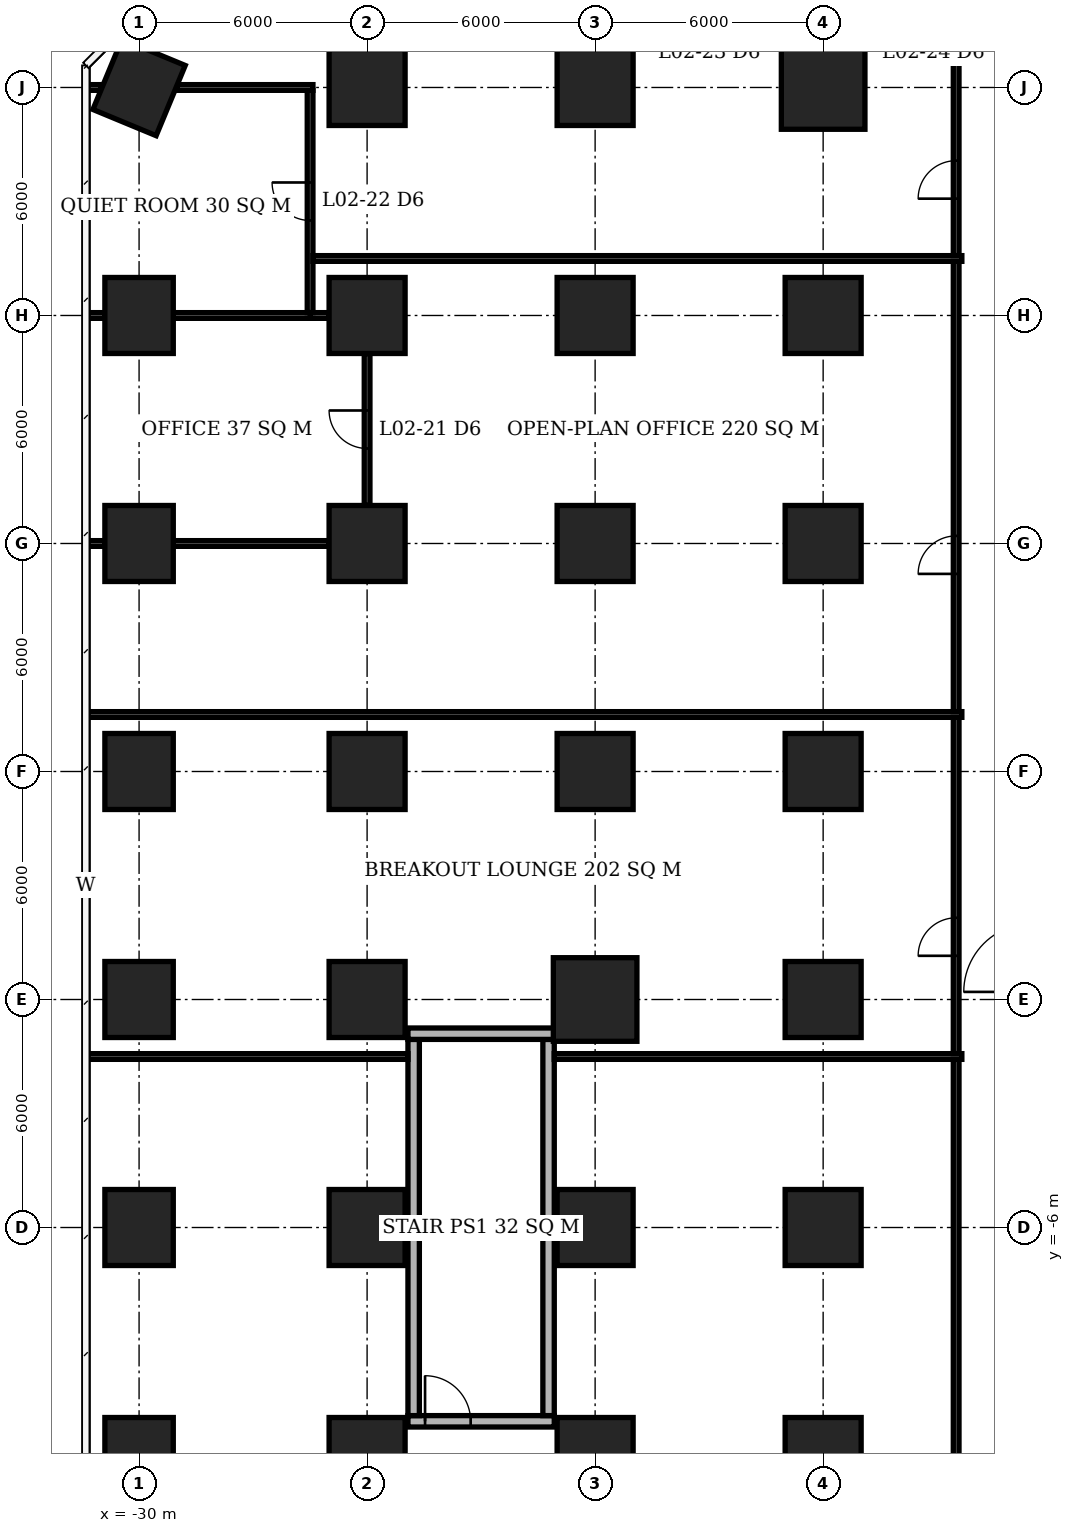
"""IFC4 building model, lengths in metres.
Left out: names, types, materials, properties, quantities, classifications, styles, units other than length and angle.
Written with IfcOpenShell. Run it as: python <this file> out.ifc"""

import sys

from ifc_helpers import new_model, si_unit, direction, frame, frame_2d, origin, origin_2d, place, context, subcontext, project, spatial, rectangle, extrude, element, fill, save


model = new_model("IFC4")
c1 = context("Model", 3, precision=1e-05, world=origin(), true_north=direction((0.0, 1.0)))
c2 = subcontext(c1, "Body", "Model", "MODEL_VIEW")
j1 = project(units=[si_unit("LENGTHUNIT", "METRE"), si_unit("PLANEANGLEUNIT", "RADIAN")], contexts=[c1])
p1 = place(None, origin())
s1 = spatial("IfcSite", under=j1, at=p1, CompositionType="ELEMENT")
p2 = place(p1, origin())
s2 = spatial("IfcBuilding", under=s1, at=p2, CompositionType="ELEMENT")
p3 = place(p2, frame((0.0, 0.0, 11.0)))
s3 = spatial("IfcBuildingStorey", under=s2, at=p3, CompositionType="ELEMENT", Elevation=11.0)
for number, where, z_axis, x_axis in (
    (1, (-30.0, -12.0, 0.0), (0.0, 0.0, 1.0), (0.0, 1.0, 0.0)),
    (2, (-30.0, -6.0, 0.0), (0.0, 0.0, 1.0), (0.0, 1.0, 0.0)),
    (3, (-30.0, 0.0, 0.0), (0.0, 0.0, 1.0), (0.0, 1.0, 0.0)),
    (4, (-30.0, 6.0, 0.0), (0.0, 0.0, 1.0), (0.0, 1.0, 0.0)),
    (5, (-30.0, 12.0, 0.0), (0.0, 0.0, 1.0), (0.0, 1.0, 0.0)),
    (6, (-30.0, 18.0, 0.0), (0.0, 0.0, 1.0), (0.0, 1.0, 0.0)),
    (7, (-30.0, 24.0, 0.0), (0.0, 0.0, 1.0), (0.383, 0.924, 0.0)),
):
    element("IfcColumn", number, at=place(p3, frame(where, z_axis=z_axis, x_axis=x_axis)), inside=s3, PredefinedType="COLUMN", context=c2, shape_type="SweptSolid", body=[
        extrude(rectangle(XDim=2.0, YDim=1.8, at=origin_2d()), origin(), (0.0, 0.0, 1.0), 7.2),
    ])
for number, where, z_axis, x_axis in (
    (8, (-24.0, -12.0, 0.0), (0.0, 0.0, 1.0), (1.0, 0.0, 0.0)),
    (9, (-24.0, -6.0, 0.0), (0.0, 0.0, 1.0), (1.0, 0.0, 0.0)),
    (10, (-24.0, 0.0, 0.0), (0.0, 0.0, 1.0), (1.0, 0.0, 0.0)),
    (11, (-24.0, 6.0, 0.0), (0.0, 0.0, 1.0), (1.0, 0.0, 0.0)),
    (12, (-24.0, 12.0, 0.0), (0.0, 0.0, 1.0), (1.0, 0.0, 0.0)),
    (13, (-24.0, 18.0, 0.0), (0.0, 0.0, 1.0), (1.0, 0.0, 0.0)),
    (14, (-24.0, 24.0, 0.0), (0.0, 0.0, 1.0), (1.0, 0.0, 0.0)),
    (15, (-18.0, -12.0, 0.0), (0.0, 0.0, 1.0), (1.0, 0.0, 0.0)),
    (16, (-18.0, -6.0, 0.0), (0.0, 0.0, 1.0), (1.0, 0.0, 0.0)),
):
    element("IfcColumn", number, at=place(p3, frame(where, z_axis=z_axis, x_axis=x_axis)), inside=s3, PredefinedType="COLUMN", context=c2, shape_type="SweptSolid", body=[
        extrude(rectangle(XDim=2.0, YDim=2.0, at=origin_2d()), origin(), (0.0, 0.0, 1.0), 7.2),
    ])
p4 = place(p3, frame((-18.0, 0.0, 0.0), z_axis=(0.0, 0.0, 1.0), x_axis=(1.0, 0.0, 0.0)))
e17 = element("IfcColumn", 17, at=p4, inside=s3, PredefinedType="COLUMN", context=c2, shape_type="SweptSolid", body=[
    extrude(rectangle(XDim=2.2, YDim=2.2, at=origin_2d()), origin(), (0.0, 0.0, 1.0), 7.2),
])
for number, where, z_axis, x_axis in (
    (18, (-18.0, 6.0, 0.0), (0.0, 0.0, 1.0), (1.0, 0.0, 0.0)),
    (19, (-18.0, 12.0, 0.0), (0.0, 0.0, 1.0), (1.0, 0.0, 0.0)),
    (20, (-18.0, 18.0, 0.0), (0.0, 0.0, 1.0), (1.0, 0.0, 0.0)),
    (21, (-18.0, 24.0, 0.0), (0.0, 0.0, 1.0), (1.0, 0.0, 0.0)),
    (22, (-12.0, -12.0, 0.0), (0.0, 0.0, 1.0), (1.0, 0.0, 0.0)),
    (23, (-12.0, -6.0, 0.0), (0.0, 0.0, 1.0), (1.0, 0.0, 0.0)),
    (24, (-12.0, 0.0, 0.0), (0.0, 0.0, 1.0), (1.0, 0.0, 0.0)),
    (25, (-12.0, 6.0, 0.0), (0.0, 0.0, 1.0), (1.0, 0.0, 0.0)),
    (26, (-12.0, 12.0, 0.0), (0.0, 0.0, 1.0), (1.0, 0.0, 0.0)),
    (27, (-12.0, 18.0, 0.0), (0.0, 0.0, 1.0), (1.0, 0.0, 0.0)),
):
    element("IfcColumn", number, at=place(p3, frame(where, z_axis=z_axis, x_axis=x_axis)), inside=s3, PredefinedType="COLUMN", context=c2, shape_type="SweptSolid", body=[
        extrude(rectangle(XDim=2.0, YDim=2.0, at=origin_2d()), origin(), (0.0, 0.0, 1.0), 7.2),
    ])
p5 = place(p3, frame((-12.0, 24.0, 0.0), z_axis=(0.0, 0.0, 1.0), x_axis=(1.0, 0.0, 0.0)))
e28 = element("IfcColumn", 28, at=p5, inside=s3, PredefinedType="COLUMN", context=c2, shape_type="SweptSolid", body=[
    extrude(rectangle(XDim=2.2, YDim=2.2, at=origin_2d()), origin(), (0.0, 0.0, 1.0), 7.2),
])
p6 = place(p3, frame((-22.925, -11.1, 0.0), z_axis=(0.0, 0.0, 1.0), x_axis=(1.0, 0.0, 0.0)))
e29 = element("IfcWall", 29, at=p6, inside=s3, PredefinedType="PARTITIONING", context=c2, shape_type="SweptSolid", body=[
    extrude(rectangle(XDim=3.85, YDim=0.3, at=frame_2d((1.925, 0.0))), origin(), (0.0, 0.0, 1.0), 6.95),
])
p7 = place(p6, frame((0.45, 0.0, 0.0)))
e30 = element("IfcOpeningElement", 30, at=p7, cuts=e29, PredefinedType="OPENING", context=c2, shape_type="SweptSolid", body=[
    extrude(rectangle(XDim=1.2, YDim=2.1, at=frame_2d((0.6, 1.05))), frame((0.0, 0.16, 0.0), z_axis=(0.0, -1.0, 0.0), x_axis=(1.0, 0.0, 0.0)), (0.0, 0.0, 1.0), 0.32),
])
p8 = place(p3, frame((-22.925, -0.9, 0.0), z_axis=(0.0, 0.0, 1.0), x_axis=(1.0, 0.0, 0.0)))
e31 = element("IfcWall", 31, at=p8, inside=s3, PredefinedType="PARTITIONING", context=c2, shape_type="SweptSolid", body=[
    extrude(rectangle(XDim=3.85, YDim=0.3, at=frame_2d((1.925, 0.0))), origin(), (0.0, 0.0, 1.0), 6.95),
])
for number, where, z_axis, x_axis in (
    (32, (-22.775, -10.95, 0.0), (0.0, 0.0, 1.0), (0.0, 1.0, 0.0)),
    (33, (-19.225, -10.95, 0.0), (0.0, 0.0, 1.0), (0.0, 1.0, 0.0)),
):
    element("IfcWall", number, at=place(p3, frame(where, z_axis=z_axis, x_axis=x_axis)), inside=s3, PredefinedType="PARTITIONING", context=c2, shape_type="SweptSolid", body=[
        extrude(rectangle(XDim=9.9, YDim=0.3, at=frame_2d((4.95, 0.0))), origin(), (0.0, 0.0, 1.0), 6.95),
    ])
p9 = place(p3, frame((-31.375, 12.0, 0.0), z_axis=(0.0, 0.0, 1.0), x_axis=(1.0, 0.0, 0.0)))
e34 = element("IfcWall", 34, at=p9, inside=s3, PredefinedType="PARTITIONING", context=c2, shape_type="SweptSolid", body=[
    extrude(rectangle(XDim=0.475, YDim=0.15, at=frame_2d((0.238, 0.0))), origin(), (0.0, 0.0, 1.0), 6.8),
])
p10 = place(p3, frame((-29.1, 12.0, 0.0), z_axis=(0.0, 0.0, 1.0), x_axis=(1.0, 0.0, 0.0)))
e35 = element("IfcWall", 35, at=p10, inside=s3, PredefinedType="PARTITIONING", context=c2, shape_type="SweptSolid", body=[
    extrude(rectangle(XDim=4.1, YDim=0.15, at=frame_2d((2.05, 0.0))), origin(), (0.0, 0.0, 1.0), 6.8),
])
p11 = place(p3, frame((-31.375, 18.0, 0.0), z_axis=(0.0, 0.0, 1.0), x_axis=(1.0, 0.0, 0.0)))
e36 = element("IfcWall", 36, at=p11, inside=s3, PredefinedType="PARTITIONING", context=c2, shape_type="SweptSolid", body=[
    extrude(rectangle(XDim=0.475, YDim=0.15, at=frame_2d((0.238, 0.0))), origin(), (0.0, 0.0, 1.0), 6.8),
])
p12 = place(p3, frame((-29.1, 18.0, 0.0), z_axis=(0.0, 0.0, 1.0), x_axis=(1.0, 0.0, 0.0)))
e37 = element("IfcWall", 37, at=p12, inside=s3, PredefinedType="PARTITIONING", context=c2, shape_type="SweptSolid", body=[
    extrude(rectangle(XDim=3.675, YDim=0.15, at=frame_2d((1.837, 0.0))), origin(), (0.0, 0.0, 1.0), 6.8),
])
p13 = place(p3, frame((-25.5, 18.0, 0.0), z_axis=(0.0, 0.0, 1.0), x_axis=(1.0, 0.0, 0.0)))
e38 = element("IfcWall", 38, at=p13, inside=s3, PredefinedType="PARTITIONING", context=c2, shape_type="SweptSolid", body=[
    extrude(rectangle(XDim=0.5, YDim=0.15, at=frame_2d((0.25, 0.0))), origin(), (0.0, 0.0, 1.0), 6.8),
])
p14 = place(p3, frame((-31.375, 24.0, 0.0), z_axis=(0.0, 0.0, 1.0), x_axis=(1.0, 0.0, 0.0)))
e39 = element("IfcWall", 39, at=p14, inside=s3, PredefinedType="PARTITIONING", context=c2, shape_type="SweptSolid", body=[
    extrude(rectangle(XDim=0.37, YDim=0.15, at=frame_2d((0.185, 0.0))), origin(), (0.0, 0.0, 1.0), 6.8),
])
p15 = place(p3, frame((-28.995, 24.0, 0.0), z_axis=(0.0, 0.0, 1.0), x_axis=(1.0, 0.0, 0.0)))
e40 = element("IfcWall", 40, at=p15, inside=s3, PredefinedType="PARTITIONING", context=c2, shape_type="SweptSolid", body=[
    extrude(rectangle(XDim=3.57, YDim=0.15, at=frame_2d((1.785, 0.0))), origin(), (0.0, 0.0, 1.0), 6.8),
])
p16 = place(p3, frame((-25.5, 18.075, 0.0), z_axis=(0.0, 0.0, 1.0), x_axis=(0.0, 1.0, 0.0)))
e41 = element("IfcWall", 41, at=p16, inside=s3, PredefinedType="PARTITIONING", context=c2, shape_type="SweptSolid", body=[
    extrude(rectangle(XDim=5.85, YDim=0.15, at=frame_2d((2.925, 0.0))), origin(), (0.0, 0.0, 1.0), 6.8),
])
p17 = place(p16, frame((2.425, 0.0, 0.0)))
e42 = element("IfcOpeningElement", 42, at=p17, cuts=e41, PredefinedType="OPENING", context=c2, shape_type="SweptSolid", body=[
    extrude(rectangle(XDim=1.0, YDim=2.1, at=frame_2d((0.5, 1.05))), frame((0.0, 0.085, 0.0), z_axis=(0.0, -1.0, 0.0), x_axis=(1.0, 0.0, 0.0)), (0.0, 0.0, 1.0), 0.17),
])
p18 = place(p3, frame((-24.0, 13.0, 0.0), z_axis=(0.0, 0.0, 1.0), x_axis=(0.0, 1.0, 0.0)))
e43 = element("IfcWall", 43, at=p18, inside=s3, PredefinedType="PARTITIONING", context=c2, shape_type="SweptSolid", body=[
    extrude(rectangle(XDim=4.0, YDim=0.15, at=frame_2d((2.0, 0.0))), origin(), (0.0, 0.0, 1.0), 6.8),
])
p19 = place(p18, frame((1.5, 0.0, 0.0)))
e44 = element("IfcOpeningElement", 44, at=p19, cuts=e43, PredefinedType="OPENING", context=c2, shape_type="SweptSolid", body=[
    extrude(rectangle(XDim=1.0, YDim=2.1, at=frame_2d((0.5, 1.05))), frame((0.0, 0.085, 0.0), z_axis=(0.0, -1.0, 0.0), x_axis=(1.0, 0.0, 0.0)), (0.0, 0.0, 1.0), 0.17),
])
p20 = place(p3, frame((-31.375, -1.5, 0.0), z_axis=(0.0, 0.0, 1.0), x_axis=(1.0, 0.0, 0.0)))
e45 = element("IfcWall", 45, at=p20, inside=s3, PredefinedType="PARTITIONING", context=c2, shape_type="SweptSolid", body=[
    extrude(rectangle(XDim=8.45, YDim=0.15, at=frame_2d((4.225, 0.0))), origin(), (0.0, 0.0, 1.0), 6.95),
])
p21 = place(p3, frame((-31.375, 7.5, 0.0), z_axis=(0.0, 0.0, 1.0), x_axis=(1.0, 0.0, 0.0)))
e46 = element("IfcWall", 46, at=p21, inside=s3, PredefinedType="PARTITIONING", context=c2, shape_type="SweptSolid", body=[
    extrude(rectangle(XDim=23.025, YDim=0.15, at=frame_2d((11.512, 0.0))), origin(), (0.0, 0.0, 1.0), 6.95),
])
p22 = place(p3, frame((-25.425, 19.5, 0.0), z_axis=(0.0, 0.0, 1.0), x_axis=(1.0, 0.0, 0.0)))
e47 = element("IfcWall", 47, at=p22, inside=s3, PredefinedType="PARTITIONING", context=c2, shape_type="SweptSolid", body=[
    extrude(rectangle(XDim=17.075, YDim=0.15, at=frame_2d((8.538, 0.0))), origin(), (0.0, 0.0, 1.0), 6.95),
])
p23 = place(p3, frame((-19.075, -1.5, 0.0), z_axis=(0.0, 0.0, 1.0), x_axis=(1.0, 0.0, 0.0)))
e48 = element("IfcWall", 48, at=p23, inside=s3, PredefinedType="PARTITIONING", context=c2, shape_type="SweptSolid", body=[
    extrude(rectangle(XDim=10.725, YDim=0.15, at=frame_2d((5.362, 0.0))), origin(), (0.0, 0.0, 1.0), 6.95),
])
p24 = place(p3, frame((-8.5, -19.425, 0.0), z_axis=(0.0, 0.0, 1.0), x_axis=(0.0, 1.0, 0.0)))
e49 = element("IfcWall", 49, at=p24, inside=s3, PredefinedType="PARTITIONING", context=c2, shape_type="SweptSolid", body=[
    extrude(rectangle(XDim=17.85, YDim=0.15, at=frame_2d((8.925, 0.0))), origin(), (0.0, 0.0, 1.0), 6.95),
])
p25 = place(p24, frame((5.774, 0.0, 0.0)))
e50 = element("IfcOpeningElement", 50, at=p25, cuts=e49, PredefinedType="OPENING", context=c2, shape_type="SweptSolid", body=[
    extrude(rectangle(XDim=1.0, YDim=2.1, at=frame_2d((0.5, 1.05))), frame((0.0, 0.085, 0.0), z_axis=(0.0, -1.0, 0.0), x_axis=(1.0, 0.0, 0.0)), (0.0, 0.0, 1.0), 0.17),
])
p26 = place(p3, frame((-8.5, -1.425, 0.0), z_axis=(0.0, 0.0, 1.0), x_axis=(0.0, 1.0, 0.0)))
e51 = element("IfcWall", 51, at=p26, inside=s3, PredefinedType="PARTITIONING", context=c2, shape_type="SweptSolid", body=[
    extrude(rectangle(XDim=8.85, YDim=0.15, at=frame_2d((4.425, 0.0))), origin(), (0.0, 0.0, 1.0), 6.95),
])
p27 = place(p26, frame((2.575, 0.0, 0.0)))
e52 = element("IfcOpeningElement", 52, at=p27, cuts=e51, PredefinedType="OPENING", context=c2, shape_type="SweptSolid", body=[
    extrude(rectangle(XDim=1.0, YDim=2.1, at=frame_2d((0.5, 1.05))), frame((0.0, 0.085, 0.0), z_axis=(0.0, -1.0, 0.0), x_axis=(1.0, 0.0, 0.0)), (0.0, 0.0, 1.0), 0.17),
])
p28 = place(p3, frame((-8.5, 7.575, 0.0), z_axis=(0.0, 0.0, 1.0), x_axis=(0.0, 1.0, 0.0)))
e53 = element("IfcWall", 53, at=p28, inside=s3, PredefinedType="PARTITIONING", context=c2, shape_type="SweptSolid", body=[
    extrude(rectangle(XDim=11.85, YDim=0.15, at=frame_2d((5.925, 0.0))), origin(), (0.0, 0.0, 1.0), 6.95),
])
p29 = place(p28, frame((3.625, 0.0, 0.0)))
e54 = element("IfcOpeningElement", 54, at=p29, cuts=e53, PredefinedType="OPENING", context=c2, shape_type="SweptSolid", body=[
    extrude(rectangle(XDim=1.0, YDim=2.1, at=frame_2d((0.5, 1.05))), frame((0.0, 0.085, 0.0), z_axis=(0.0, -1.0, 0.0), x_axis=(1.0, 0.0, 0.0)), (0.0, 0.0, 1.0), 0.17),
])
p30 = place(p3, frame((-8.5, 19.575, 0.0), z_axis=(0.0, 0.0, 1.0), x_axis=(0.0, 1.0, 0.0)))
e55 = element("IfcWall", 55, at=p30, inside=s3, PredefinedType="PARTITIONING", context=c2, shape_type="SweptSolid", body=[
    extrude(rectangle(XDim=5.85, YDim=0.15, at=frame_2d((2.925, 0.0))), origin(), (0.0, 0.0, 1.0), 6.95),
])
p31 = place(p30, frame((1.499, 0.0, 0.0)))
e56 = element("IfcOpeningElement", 56, at=p31, cuts=e55, PredefinedType="OPENING", context=c2, shape_type="SweptSolid", body=[
    extrude(rectangle(XDim=1.0, YDim=2.1, at=frame_2d((0.5, 1.05))), frame((0.0, 0.085, 0.0), z_axis=(0.0, -1.0, 0.0), x_axis=(1.0, 0.0, 0.0)), (0.0, 0.0, 1.0), 0.17),
])
p32 = place(p7, origin())
e57 = element("IfcDoor", 57, at=p32, inside=s3, OperationType="SINGLE_SWING_LEFT", PredefinedType="DOOR", context=c2, shape_type="SweptSolid", body=[
    extrude(rectangle(XDim=1.2, YDim=2.1, at=frame_2d((0.6, 1.05))), frame((0.0, 0.025, 0.0), z_axis=(0.0, -1.0, 0.0), x_axis=(1.0, 0.0, 0.0)), (0.0, 0.0, 1.0), 0.05),
])
fill(e30, e57)
p33 = place(p19, origin())
e58 = element("IfcDoor", 58, at=p33, inside=s3, OperationType="SINGLE_SWING_RIGHT", PredefinedType="DOOR", context=c2, shape_type="SweptSolid", body=[
    extrude(rectangle(XDim=1.0, YDim=2.1, at=frame_2d((0.5, 1.05))), frame((0.0, 0.025, 0.0), z_axis=(0.0, -1.0, 0.0), x_axis=(1.0, 0.0, 0.0)), (0.0, 0.0, 1.0), 0.05),
])
fill(e44, e58)
p34 = place(p17, origin())
e59 = element("IfcDoor", 59, at=p34, inside=s3, OperationType="SINGLE_SWING_RIGHT", PredefinedType="DOOR", context=c2, shape_type="SweptSolid", body=[
    extrude(rectangle(XDim=1.0, YDim=2.1, at=frame_2d((0.5, 1.05))), frame((0.0, 0.025, 0.0), z_axis=(0.0, -1.0, 0.0), x_axis=(1.0, 0.0, 0.0)), (0.0, 0.0, 1.0), 0.05),
])
fill(e42, e59)
p35 = place(p27, origin())
e60 = element("IfcDoor", 60, at=p35, inside=s3, OperationType="SINGLE_SWING_LEFT", PredefinedType="DOOR", context=c2, shape_type="SweptSolid", body=[
    extrude(rectangle(XDim=1.0, YDim=2.1, at=frame_2d((0.5, 1.05))), frame((0.0, 0.025, 0.0), z_axis=(0.0, -1.0, 0.0), x_axis=(1.0, 0.0, 0.0)), (0.0, 0.0, 1.0), 0.05),
])
fill(e52, e60)
p36 = place(p29, origin())
e61 = element("IfcDoor", 61, at=p36, inside=s3, OperationType="SINGLE_SWING_LEFT", PredefinedType="DOOR", context=c2, shape_type="SweptSolid", body=[
    extrude(rectangle(XDim=1.0, YDim=2.1, at=frame_2d((0.5, 1.05))), frame((0.0, 0.025, 0.0), z_axis=(0.0, -1.0, 0.0), x_axis=(1.0, 0.0, 0.0)), (0.0, 0.0, 1.0), 0.05),
])
fill(e54, e61)
p37 = place(p31, origin())
e62 = element("IfcDoor", 62, at=p37, inside=s3, OperationType="SINGLE_SWING_LEFT", PredefinedType="DOOR", context=c2, shape_type="SweptSolid", body=[
    extrude(rectangle(XDim=1.0, YDim=2.1, at=frame_2d((0.5, 1.05))), frame((0.0, 0.025, 0.0), z_axis=(0.0, -1.0, 0.0), x_axis=(1.0, 0.0, 0.0)), (0.0, 0.0, 1.0), 0.05),
])
fill(e56, e62)
save(model, sys.argv[1])
